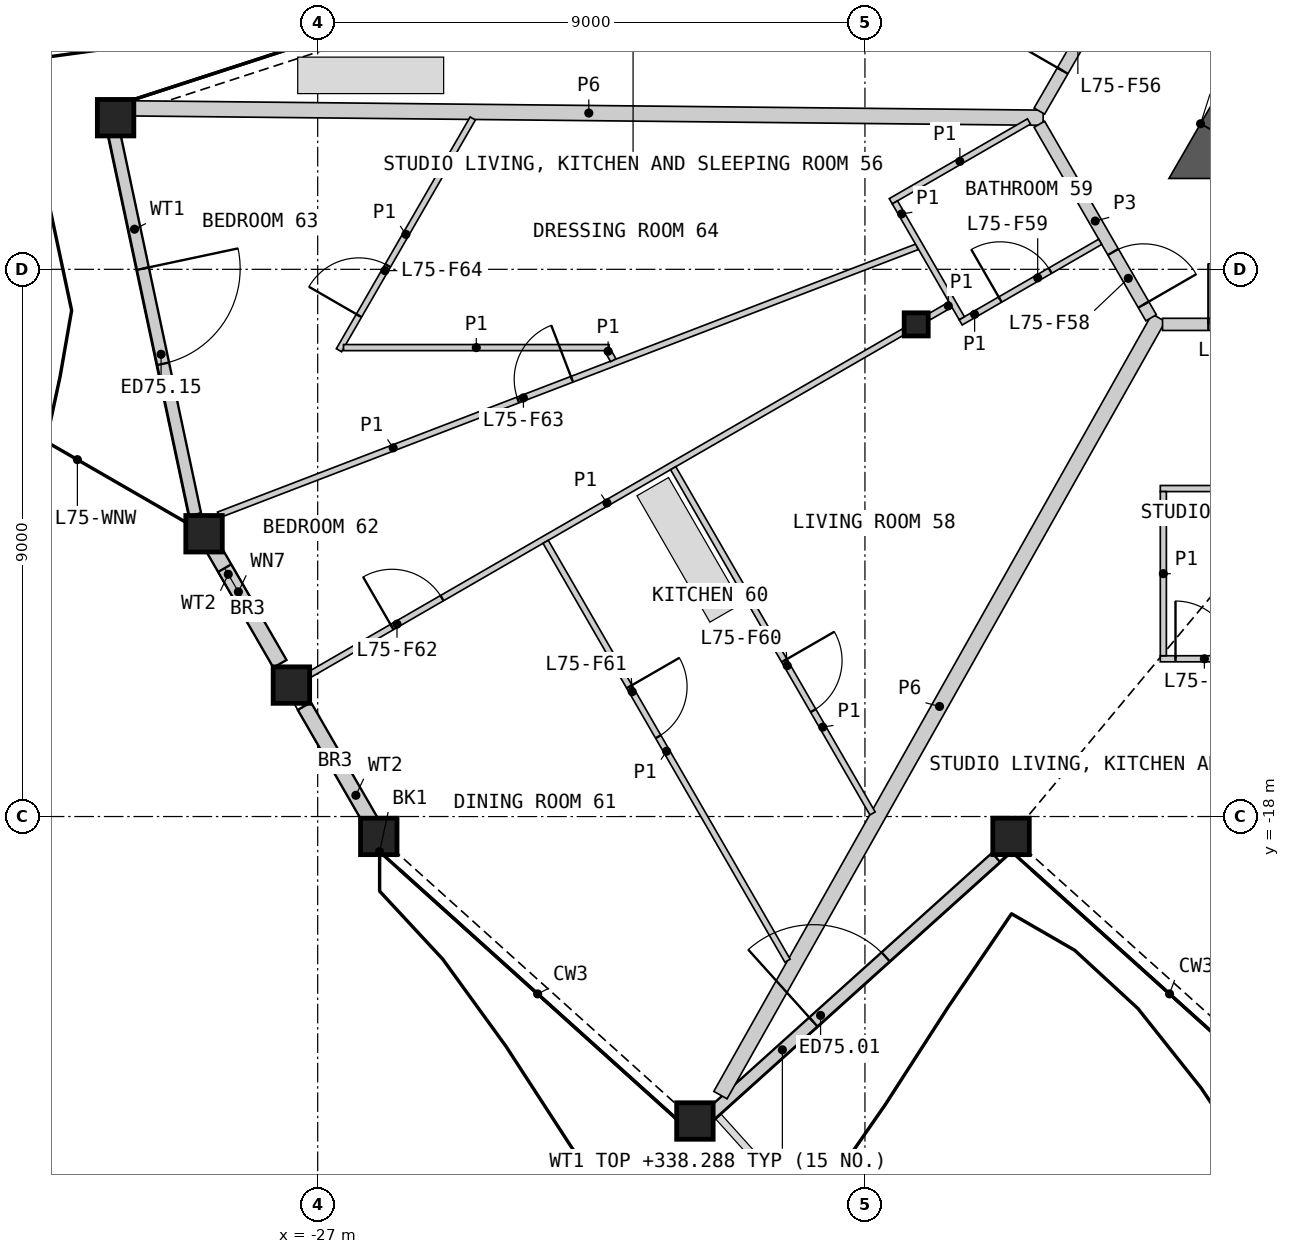
"""IFC4 building model, lengths in metres.
Left out: names, types, materials, properties, quantities, classifications, styles, units other than length and angle.
Written with IfcOpenShell. Run it as: python <this file> out.ifc"""

import sys

from ifc_helpers import new_model, si_unit, direction, frame, frame_2d, origin, origin_2d, place, context, subcontext, project, spatial, polyline, rectangle, hollow_rectangle, i_section, outline, extrude, element, fill, save


model = new_model("IFC4")
c1 = context("Model", 3, precision=1e-05, world=origin(), true_north=direction((0.0, 1.0)))
c2 = subcontext(c1, "Body", "Model", "MODEL_VIEW")
j1 = project(units=[si_unit("LENGTHUNIT", "METRE"), si_unit("PLANEANGLEUNIT", "RADIAN")], contexts=[c1])
p1 = place(None, origin())
s1 = spatial("IfcSite", under=j1, at=p1, CompositionType="ELEMENT")
p2 = place(p1, origin())
s2 = spatial("IfcBuilding", under=s1, at=p2, CompositionType="ELEMENT")
p3 = place(p2, frame((0.0, 0.0, 335.8)))
s3 = spatial("IfcBuildingStorey", under=s2, at=p3, CompositionType="ELEMENT", Elevation=335.8)
for number, where, z_axis, x_axis in (
    (1, (-25.995, -18.327, 0.0), (0.0, 0.0, 1.0), (1.0, 0.0, 0.0)),
    (2, (-20.796, -23.008, 0.0), (0.0, 0.0, 1.0), (1.0, 0.0, 0.0)),
    (3, (-15.597, -18.327, 0.0), (0.0, 0.0, 1.0), (1.0, 0.0, 0.0)),
    (4, (-30.324, -6.506, 0.0), (0.0, 0.0, 1.0), (1.0, 0.0, 0.0)),
    (5, (-28.869, -13.349, 0.0), (0.0, 0.0, 1.0), (1.0, 0.0, 0.0)),
    (6, (-27.432, -15.838, 0.0), (0.0, 0.0, 1.0), (1.0, 0.0, 0.0)),
):
    element("IfcColumn", number, at=place(p3, frame(where, z_axis=z_axis, x_axis=x_axis)), inside=s3, PredefinedType="COLUMN", context=c2, shape_type="SweptSolid", body=[
        extrude(hollow_rectangle(XDim=0.6, YDim=0.6, WallThickness=0.04, at=origin_2d()), origin(), (0.0, 0.0, 1.0), 3.4),
    ])
p4 = place(p3, frame((-17.157, -9.906, 0.0), z_axis=(0.0, 0.0, 1.0), x_axis=(1.0, 0.0, 0.0)))
e7 = element("IfcColumn", 7, at=p4, inside=s3, PredefinedType="COLUMN", context=c2, shape_type="SweptSolid", body=[
    extrude(i_section(OverallWidth=0.396, OverallDepth=0.381, WebThickness=0.019, FlangeThickness=0.03, at=origin_2d()), origin(), (0.0, 0.0, 1.0), 3.4),
])
p5 = place(p3, frame((-20.53, -22.892, 0.0), z_axis=(0.0, 0.0, 1.0), x_axis=(0.743134328827, 0.669142263887, 0.0)))
e8 = element("IfcWall", 8, at=p5, inside=s3, PredefinedType="SOLIDWALL", context=c2, shape_type="SweptSolid", body=[
    extrude(rectangle(XDim=6.305, YDim=0.2, at=frame_2d((3.153, 0.0))), origin(), (0.0, 0.0, 1.0), 2.488),
])
p6 = place(p5, frame((2.262, 0.0, 0.0)))
e9 = element("IfcOpeningElement", 9, at=p6, cuts=e8, PredefinedType="OPENING", context=c2, shape_type="SweptSolid", body=[
    extrude(rectangle(XDim=1.6, YDim=2.25, at=frame_2d((0.8, 1.125))), frame((0.0, 0.11, 0.0), z_axis=(0.0, -1.0, 0.0), x_axis=(1.0, 0.0, 0.0)), (0.0, 0.0, 1.0), 0.22),
])
p7 = place(p3, frame((-30.345, -6.776, 0.0), z_axis=(0.0, 0.0, 1.0), x_axis=(0.207897099812, -0.978150702034, 0.0)))
e10 = element("IfcWall", 10, at=p7, inside=s3, PredefinedType="SOLIDWALL", context=c2, shape_type="SweptSolid", body=[
    extrude(rectangle(XDim=6.396, YDim=0.2, at=frame_2d((3.198, 0.0))), origin(), (0.0, 0.0, 1.0), 2.488),
])
p8 = place(p7, frame((2.262, 0.0, 0.0)))
e11 = element("IfcOpeningElement", 11, at=p8, cuts=e10, PredefinedType="OPENING", context=c2, shape_type="SweptSolid", body=[
    extrude(rectangle(XDim=1.6, YDim=2.25, at=frame_2d((0.8, 1.125))), frame((0.0, 0.11, 0.0), z_axis=(0.0, -1.0, 0.0), x_axis=(1.0, 0.0, 0.0)), (0.0, 0.0, 1.0), 0.22),
])
p9 = place(p3, frame((-28.754, -13.525, 0.0), z_axis=(0.0, 0.0, 1.0), x_axis=(0.49996174997, -0.866047486323, 0.0)))
e12 = element("IfcWall", 12, at=p9, inside=s3, PredefinedType="SOLIDWALL", context=c2, shape_type="SweptSolid", body=[
    extrude(rectangle(XDim=2.267, YDim=0.25, at=frame_2d((1.133, 0.0))), origin(), (0.0, 0.0, 1.0), 2.488),
])
p10 = place(p9, frame((0.45, 0.0, 1.6)))
e13 = element("IfcOpeningElement", 13, at=p10, cuts=e12, PredefinedType="OPENING", context=c2, shape_type="SweptSolid", body=[
    extrude(rectangle(XDim=0.9, YDim=0.6, at=frame_2d((0.45, 0.3))), frame((0.0, 0.135, 0.0), z_axis=(0.0, -1.0, 0.0), x_axis=(1.0, 0.0, 0.0)), (0.0, 0.0, 1.0), 0.27),
])
p11 = place(p3, frame((-27.219, -16.184, 0.0), z_axis=(0.0, 0.0, 1.0), x_axis=(0.500046963369, -0.865998287773, 0.0)))
e14 = element("IfcWall", 14, at=p11, inside=s3, PredefinedType="SOLIDWALL", context=c2, shape_type="SweptSolid", body=[
    extrude(rectangle(XDim=2.258, YDim=0.25, at=frame_2d((1.129, 0.0))), origin(), (0.0, 0.0, 1.0), 2.488),
])
p12 = place(p3, frame((-9.562, -2.15, 0.0), z_axis=(0.0, 0.0, 1.0), x_axis=(-0.500015214976, -0.866016619236, 0.0)))
e15 = element("IfcWall", 15, at=p12, inside=s3, PredefinedType="SHEAR", context=c2, shape_type="SweptSolid", body=[
    extrude(rectangle(XDim=5.318, YDim=0.6, at=frame_2d((2.659, 0.0))), origin(), (0.0, 0.0, 1.0), 3.1),
])
p13 = place(p3, origin())
e16 = element("IfcWall", 16, at=p13, inside=s3, PredefinedType="SHEAR", context=c2, shape_type="SweptSolid", body=[
    extrude(outline(polyline([(-12.48, -6.606), (-11.961, -6.906), (-11.961, -7.506), (-13.0, -7.506), (-12.48, -6.606)])), origin(), (0.0, 0.0, 1.0), 3.1),
])
p14 = place(p3, frame((-30.014, -6.353, 0.0), z_axis=(0.0, 0.0, 1.0), x_axis=(0.999946875776, -0.010307551845, 0.0)))
e17 = element("IfcWall", 17, at=p14, inside=s3, PredefinedType="PARTITIONING", context=c2, shape_type="SweptSolid", body=[
    extrude(rectangle(XDim=14.946, YDim=0.25, at=frame_2d((7.473, 0.0))), origin(), (0.0, 0.0, 1.0), 2.33),
])
p15 = place(p3, frame((-20.376, -22.582, 0.0), z_axis=(0.0, 0.0, 1.0), x_axis=(0.491057132664, 0.871127368678, 0.0)))
e18 = element("IfcWall", 18, at=p15, inside=s3, PredefinedType="PARTITIONING", context=c2, shape_type="SweptSolid", body=[
    extrude(rectangle(XDim=14.677, YDim=0.25, at=frame_2d((7.338, 0.0))), origin(), (0.0, 0.0, 1.0), 2.33),
])
p16 = place(p3, frame((-13.106, -9.906, 0.0), z_axis=(0.0, 0.0, 1.0), x_axis=(1.0, 0.0, 0.0)))
e19 = element("IfcWall", 19, at=p16, inside=s3, PredefinedType="PARTITIONING", context=c2, shape_type="SweptSolid", body=[
    extrude(rectangle(XDim=4.32, YDim=0.2, at=frame_2d((2.16, 0.0))), origin(), (0.0, 0.0, 1.0), 3.1),
])
p17 = place(p16, frame((0.753, 0.0, 0.0)))
e20 = element("IfcOpeningElement", 20, at=p17, cuts=e19, PredefinedType="OPENING", context=c2, shape_type="SweptSolid", body=[
    extrude(rectangle(XDim=1.0, YDim=2.1, at=frame_2d((0.5, 1.05))), frame((0.0, 0.11, 0.0), z_axis=(0.0, -1.0, 0.0), x_axis=(1.0, 0.0, 0.0)), (0.0, 0.0, 1.0), 0.22),
])
p18 = place(p3, frame((-15.131, -6.397, 0.0), z_axis=(0.0, 0.0, 1.0), x_axis=(0.500003406062, 0.866023437285, 0.0)))
e21 = element("IfcWall", 21, at=p18, inside=s3, PredefinedType="PARTITIONING", context=c2, shape_type="SweptSolid", body=[
    extrude(rectangle(XDim=4.288, YDim=0.2, at=frame_2d((2.144, 0.0))), origin(), (0.0, 0.0, 1.0), 3.1),
])
p19 = place(p18, frame((0.766, 0.0, 0.0)))
e22 = element("IfcOpeningElement", 22, at=p19, cuts=e21, PredefinedType="OPENING", context=c2, shape_type="SweptSolid", body=[
    extrude(rectangle(XDim=1.0, YDim=2.1, at=frame_2d((0.5, 1.05))), frame((0.0, 0.11, 0.0), z_axis=(0.0, -1.0, 0.0), x_axis=(1.0, 0.0, 0.0)), (0.0, 0.0, 1.0), 0.22),
])
p20 = place(p3, frame((-15.131, -6.614, 0.0), z_axis=(0.0, 0.0, 1.0), x_axis=(0.499967746641, -0.866044024469, 0.0)))
e23 = element("IfcWall", 23, at=p20, inside=s3, PredefinedType="PARTITIONING", context=c2, shape_type="SweptSolid", body=[
    extrude(rectangle(XDim=3.676, YDim=0.2, at=frame_2d((1.838, 0.0))), origin(), (0.0, 0.0, 1.0), 3.1),
])
p21 = place(p20, frame((2.426, 0.0, 0.0)))
e24 = element("IfcOpeningElement", 24, at=p21, cuts=e23, PredefinedType="OPENING", context=c2, shape_type="SweptSolid", body=[
    extrude(rectangle(XDim=1.0, YDim=2.1, at=frame_2d((0.5, 1.05))), frame((0.0, 0.11, 0.0), z_axis=(0.0, -1.0, 0.0), x_axis=(1.0, 0.0, 0.0)), (0.0, 0.0, 1.0), 0.22),
])
p22 = place(p3, frame((-28.631, -13.039, 0.0), z_axis=(0.0, 0.0, 1.0), x_axis=(0.933581130309, 0.358366116048, 0.0)))
e25 = element("IfcWall", 25, at=p22, inside=s3, PredefinedType="PARTITIONING", context=c2, shape_type="SweptSolid", body=[
    extrude(rectangle(XDim=12.306, YDim=0.1, at=frame_2d((6.153, 0.0))), origin(), (0.0, 0.0, 1.0), 2.33),
])
p23 = place(p22, frame((5.276, 0.0, 0.0)))
e26 = element("IfcOpeningElement", 26, at=p23, cuts=e25, PredefinedType="OPENING", context=c2, shape_type="SweptSolid", body=[
    extrude(rectangle(XDim=0.95, YDim=2.1, at=frame_2d((0.475, 1.05))), frame((0.0, 0.06, 0.0), z_axis=(0.0, -1.0, 0.0), x_axis=(1.0, 0.0, 0.0)), (0.0, 0.0, 1.0), 0.12),
])
p24 = place(p3, frame((-27.122, -15.659, 0.0), z_axis=(0.0, 0.0, 1.0), x_axis=(0.866021046153, 0.500007547564, 0.0)))
e27 = element("IfcWall", 27, at=p24, inside=s3, PredefinedType="PARTITIONING", context=c2, shape_type="SweptSolid", body=[
    extrude(rectangle(XDim=11.267, YDim=0.1, at=frame_2d((5.634, 0.0))), origin(), (0.0, 0.0, 1.0), 2.33),
])
p25 = place(p24, frame((1.552, 0.0, 0.0)))
e28 = element("IfcOpeningElement", 28, at=p25, cuts=e27, PredefinedType="OPENING", context=c2, shape_type="SweptSolid", body=[
    extrude(rectangle(XDim=0.95, YDim=2.1, at=frame_2d((0.475, 1.05))), frame((0.0, 0.06, 0.0), z_axis=(0.0, -1.0, 0.0), x_axis=(1.0, 0.0, 0.0)), (0.0, 0.0, 1.0), 0.12),
])
p26 = place(p3, frame((-23.251, -13.482, 0.0), z_axis=(0.0, 0.0, 1.0), x_axis=(0.500017325895, -0.866015400443, 0.0)))
e29 = element("IfcWall", 29, at=p26, inside=s3, PredefinedType="PARTITIONING", context=c2, shape_type="SweptSolid", body=[
    extrude(rectangle(XDim=7.955, YDim=0.1, at=frame_2d((3.978, 0.0))), origin(), (0.0, 0.0, 1.0), 2.33),
])
p27 = place(p26, frame((2.752, 0.0, 0.0)))
e30 = element("IfcOpeningElement", 30, at=p27, cuts=e29, PredefinedType="OPENING", context=c2, shape_type="SweptSolid", body=[
    extrude(rectangle(XDim=0.95, YDim=2.1, at=frame_2d((0.475, 1.05))), frame((0.0, 0.06, 0.0), z_axis=(0.0, -1.0, 0.0), x_axis=(1.0, 0.0, 0.0)), (0.0, 0.0, 1.0), 0.12),
])
p28 = place(p3, frame((-21.154, -12.271, 0.0), z_axis=(0.0, 0.0, 1.0), x_axis=(0.500011451804, -0.866018791981, 0.0)))
e31 = element("IfcWall", 31, at=p28, inside=s3, PredefinedType="PARTITIONING", context=c2, shape_type="SweptSolid", body=[
    extrude(rectangle(XDim=6.557, YDim=0.1, at=frame_2d((3.278, 0.0))), origin(), (0.0, 0.0, 1.0), 2.33),
])
p29 = place(p28, frame((3.655, 0.0, 0.0)))
e32 = element("IfcOpeningElement", 32, at=p29, cuts=e31, PredefinedType="OPENING", context=c2, shape_type="SweptSolid", body=[
    extrude(rectangle(XDim=0.95, YDim=2.1, at=frame_2d((0.475, 1.05))), frame((0.0, 0.06, 0.0), z_axis=(0.0, -1.0, 0.0), x_axis=(1.0, 0.0, 0.0)), (0.0, 0.0, 1.0), 0.12),
])
p30 = place(p3, frame((-13.143, -12.606, 0.0), z_axis=(0.0, 0.0, 1.0), x_axis=(1.0, 0.0, 0.0)))
e33 = element("IfcWall", 33, at=p30, inside=s3, PredefinedType="PARTITIONING", context=c2, shape_type="SweptSolid", body=[
    extrude(rectangle(XDim=5.5, YDim=0.1, at=frame_2d((2.75, 0.0))), origin(), (0.0, 0.0, 1.0), 2.33),
])
p31 = place(p3, frame((-13.143, -15.406, 0.0), z_axis=(0.0, 0.0, 1.0), x_axis=(1.0, 0.0, 0.0)))
e34 = element("IfcWall", 34, at=p31, inside=s3, PredefinedType="PARTITIONING", context=c2, shape_type="SweptSolid", body=[
    extrude(rectangle(XDim=5.5, YDim=0.1, at=frame_2d((2.75, 0.0))), origin(), (0.0, 0.0, 1.0), 2.33),
])
p32 = place(p31, frame((0.25, 0.0, 0.0)))
e35 = element("IfcOpeningElement", 35, at=p32, cuts=e34, PredefinedType="OPENING", context=c2, shape_type="SweptSolid", body=[
    extrude(rectangle(XDim=0.95, YDim=2.1, at=frame_2d((0.475, 1.05))), frame((0.0, 0.06, 0.0), z_axis=(0.0, -1.0, 0.0), x_axis=(1.0, 0.0, 0.0)), (0.0, 0.0, 1.0), 0.12),
])
p33 = place(p31, frame((3.591, 0.0, 0.0)))
e36 = element("IfcOpeningElement", 36, at=p33, cuts=e34, PredefinedType="OPENING", context=c2, shape_type="SweptSolid", body=[
    extrude(rectangle(XDim=0.95, YDim=2.1, at=frame_2d((0.475, 1.05))), frame((0.0, 0.06, 0.0), z_axis=(0.0, -1.0, 0.0), x_axis=(1.0, 0.0, 0.0)), (0.0, 0.0, 1.0), 0.12),
])
p34 = place(p3, frame((-26.65, -10.331, 0.0), z_axis=(0.0, 0.0, 1.0), x_axis=(0.499992938033, 0.866029480975, 0.0)))
e37 = element("IfcWall", 37, at=p34, inside=s3, PredefinedType="PARTITIONING", context=c2, shape_type="SweptSolid", body=[
    extrude(rectangle(XDim=4.401, YDim=0.1, at=frame_2d((2.201, 0.0))), origin(), (0.0, 0.0, 1.0), 2.33),
])
p35 = place(p34, frame((0.657, 0.0, 0.0)))
e38 = element("IfcOpeningElement", 38, at=p35, cuts=e37, PredefinedType="OPENING", context=c2, shape_type="SweptSolid", body=[
    extrude(rectangle(XDim=0.95, YDim=2.1, at=frame_2d((0.475, 1.05))), frame((0.0, 0.06, 0.0), z_axis=(0.0, -1.0, 0.0), x_axis=(1.0, 0.0, 0.0)), (0.0, 0.0, 1.0), 0.12),
])
p36 = place(p3, frame((-26.575, -10.287, 0.0), z_axis=(0.0, 0.0, 1.0), x_axis=(1.0, 0.0, 0.0)))
e39 = element("IfcWall", 39, at=p36, inside=s3, PredefinedType="PARTITIONING", context=c2, shape_type="SweptSolid", body=[
    extrude(rectangle(XDim=4.367, YDim=0.1, at=frame_2d((2.184, 0.0))), origin(), (0.0, 0.0, 1.0), 2.33),
])
p37 = place(p3, frame((-13.093, -15.356, 0.0), z_axis=(0.0, 0.0, 1.0), x_axis=(0.0, 1.0, 0.0)))
e40 = element("IfcWall", 40, at=p37, inside=s3, PredefinedType="PARTITIONING", context=c2, shape_type="SweptSolid", body=[
    extrude(rectangle(XDim=2.7, YDim=0.1, at=frame_2d((1.35, 0.0))), origin(), (0.0, 0.0, 1.0), 2.33),
])
p38 = place(p3, frame((-16.426, -9.872, 0.0), z_axis=(0.0, 0.0, 1.0), x_axis=(0.866029095148, 0.499993606316, 0.0)))
e41 = element("IfcWall", 41, at=p38, inside=s3, PredefinedType="PARTITIONING", context=c2, shape_type="SweptSolid", body=[
    extrude(rectangle(XDim=2.65, YDim=0.1, at=frame_2d((1.325, 0.0))), origin(), (0.0, 0.0, 1.0), 2.33),
])
p39 = place(p38, frame((0.75, 0.0, 0.0)))
e42 = element("IfcOpeningElement", 42, at=p39, cuts=e41, PredefinedType="OPENING", context=c2, shape_type="SweptSolid", body=[
    extrude(rectangle(XDim=0.95, YDim=2.1, at=frame_2d((0.475, 1.05))), frame((0.0, 0.06, 0.0), z_axis=(0.0, -1.0, 0.0), x_axis=(1.0, 0.0, 0.0)), (0.0, 0.0, 1.0), 0.12),
])
p40 = place(p3, frame((-17.575, -7.881, 0.0), z_axis=(0.0, 0.0, 1.0), x_axis=(0.866036909293, 0.499980071345, 0.0)))
e43 = element("IfcWall", 43, at=p40, inside=s3, PredefinedType="PARTITIONING", context=c2, shape_type="SweptSolid", body=[
    extrude(rectangle(XDim=2.625, YDim=0.1, at=frame_2d((1.312, 0.0))), origin(), (0.0, 0.0, 1.0), 2.33),
])
p41 = place(p3, frame((-17.507, -7.899, 0.0), z_axis=(0.0, 0.0, 1.0), x_axis=(0.499946605688, -0.86605622881, 0.0)))
e44 = element("IfcWall", 44, at=p41, inside=s3, PredefinedType="PARTITIONING", context=c2, shape_type="SweptSolid", body=[
    extrude(rectangle(XDim=2.2, YDim=0.1, at=frame_2d((1.1, 0.0))), origin(), (0.0, 0.0, 1.0), 2.33),
])
p42 = place(p3, frame((-16.949, -9.786, 0.0), z_axis=(0.0, 0.0, 1.0), x_axis=(0.866036909293, 0.499980071345, 0.0)))
e45 = element("IfcWall", 45, at=p42, inside=s3, PredefinedType="PARTITIONING", context=c2, shape_type="SweptSolid", body=[
    extrude(rectangle(XDim=0.41, YDim=0.1, at=frame_2d((0.205, 0.0))), origin(), (0.0, 0.0, 1.0), 2.33),
])
p43 = place(p3, frame((-22.233, -10.331, 0.0), z_axis=(0.0, 0.0, 1.0), x_axis=(0.500169931485, -0.865927271564, 0.0)))
e46 = element("IfcWall", 46, at=p43, inside=s3, PredefinedType="PARTITIONING", context=c2, shape_type="SweptSolid", body=[
    extrude(rectangle(XDim=0.189, YDim=0.1, at=frame_2d((0.094, 0.0))), origin(), (0.0, 0.0, 1.0), 2.33),
])
p44 = place(p6, origin())
e47 = element("IfcDoor", 47, at=p44, inside=s3, OperationType="DOUBLE_DOOR_SINGLE_SWING", PredefinedType="DOOR", context=c2, shape_type="SweptSolid", body=[
    extrude(rectangle(XDim=1.6, YDim=2.25, at=frame_2d((0.8, 1.125))), frame((0.0, 0.025, 0.0), z_axis=(0.0, -1.0, 0.0), x_axis=(1.0, 0.0, 0.0)), (0.0, 0.0, 1.0), 0.05),
])
fill(e9, e47)
p45 = place(p8, origin())
e48 = element("IfcDoor", 48, at=p45, inside=s3, OperationType="DOUBLE_DOOR_SINGLE_SWING", PredefinedType="DOOR", context=c2, shape_type="SweptSolid", body=[
    extrude(rectangle(XDim=1.6, YDim=2.25, at=frame_2d((0.8, 1.125))), frame((0.0, 0.025, 0.0), z_axis=(0.0, -1.0, 0.0), x_axis=(1.0, 0.0, 0.0)), (0.0, 0.0, 1.0), 0.05),
])
fill(e11, e48)
p46 = place(p10, origin())
e49 = element("IfcWindow", 49, at=p46, inside=s3, PartitioningType="SINGLE_PANEL", PredefinedType="WINDOW", context=c2, shape_type="SweptSolid", body=[
    extrude(rectangle(XDim=0.9, YDim=0.6, at=frame_2d((0.45, 0.3))), frame((0.0, 0.03, 0.0), z_axis=(0.0, -1.0, 0.0), x_axis=(1.0, 0.0, 0.0)), (0.0, 0.0, 1.0), 0.06),
])
fill(e13, e49)
p47 = place(p17, origin())
e50 = element("IfcDoor", 50, at=p47, inside=s3, OperationType="SINGLE_SWING_LEFT", PredefinedType="DOOR", context=c2, shape_type="SweptSolid", body=[
    extrude(rectangle(XDim=1.0, YDim=2.1, at=frame_2d((0.5, 1.05))), frame((0.0, 0.025, 0.0), z_axis=(0.0, -1.0, 0.0), x_axis=(1.0, 0.0, 0.0)), (0.0, 0.0, 1.0), 0.05),
])
fill(e20, e50)
p48 = place(p32, origin())
e51 = element("IfcDoor", 51, at=p48, inside=s3, OperationType="SINGLE_SWING_LEFT", PredefinedType="DOOR", context=c2, shape_type="SweptSolid", body=[
    extrude(rectangle(XDim=0.95, YDim=2.1, at=frame_2d((0.475, 1.05))), frame((0.0, 0.025, 0.0), z_axis=(0.0, -1.0, 0.0), x_axis=(1.0, 0.0, 0.0)), (0.0, 0.0, 1.0), 0.05),
])
fill(e35, e51)
p49 = place(p19, origin())
e52 = element("IfcDoor", 52, at=p49, inside=s3, OperationType="SINGLE_SWING_LEFT", PredefinedType="DOOR", context=c2, shape_type="SweptSolid", body=[
    extrude(rectangle(XDim=1.0, YDim=2.1, at=frame_2d((0.5, 1.05))), frame((0.0, 0.025, 0.0), z_axis=(0.0, -1.0, 0.0), x_axis=(1.0, 0.0, 0.0)), (0.0, 0.0, 1.0), 0.05),
])
fill(e22, e52)
p50 = place(p21, origin())
e53 = element("IfcDoor", 53, at=p50, inside=s3, OperationType="SINGLE_SWING_RIGHT", PredefinedType="DOOR", context=c2, shape_type="SweptSolid", body=[
    extrude(rectangle(XDim=1.0, YDim=2.1, at=frame_2d((0.5, 1.05))), frame((0.0, 0.025, 0.0), z_axis=(0.0, -1.0, 0.0), x_axis=(1.0, 0.0, 0.0)), (0.0, 0.0, 1.0), 0.05),
])
fill(e24, e53)
p51 = place(p39, origin())
e54 = element("IfcDoor", 54, at=p51, inside=s3, OperationType="SINGLE_SWING_LEFT", PredefinedType="DOOR", context=c2, shape_type="SweptSolid", body=[
    extrude(rectangle(XDim=0.95, YDim=2.1, at=frame_2d((0.475, 1.05))), frame((0.0, 0.025, 0.0), z_axis=(0.0, -1.0, 0.0), x_axis=(1.0, 0.0, 0.0)), (0.0, 0.0, 1.0), 0.05),
])
fill(e42, e54)
p52 = place(p29, origin())
e55 = element("IfcDoor", 55, at=p52, inside=s3, OperationType="SINGLE_SWING_LEFT", PredefinedType="DOOR", context=c2, shape_type="SweptSolid", body=[
    extrude(rectangle(XDim=0.95, YDim=2.1, at=frame_2d((0.475, 1.05))), frame((0.0, 0.025, 0.0), z_axis=(0.0, -1.0, 0.0), x_axis=(1.0, 0.0, 0.0)), (0.0, 0.0, 1.0), 0.05),
])
fill(e32, e55)
p53 = place(p27, origin())
e56 = element("IfcDoor", 56, at=p53, inside=s3, OperationType="SINGLE_SWING_LEFT", PredefinedType="DOOR", context=c2, shape_type="SweptSolid", body=[
    extrude(rectangle(XDim=0.95, YDim=2.1, at=frame_2d((0.475, 1.05))), frame((0.0, 0.025, 0.0), z_axis=(0.0, -1.0, 0.0), x_axis=(1.0, 0.0, 0.0)), (0.0, 0.0, 1.0), 0.05),
])
fill(e30, e56)
p54 = place(p25, origin())
e57 = element("IfcDoor", 57, at=p54, inside=s3, OperationType="SINGLE_SWING_LEFT", PredefinedType="DOOR", context=c2, shape_type="SweptSolid", body=[
    extrude(rectangle(XDim=0.95, YDim=2.1, at=frame_2d((0.475, 1.05))), frame((0.0, 0.025, 0.0), z_axis=(0.0, -1.0, 0.0), x_axis=(1.0, 0.0, 0.0)), (0.0, 0.0, 1.0), 0.05),
])
fill(e28, e57)
p55 = place(p23, origin())
e58 = element("IfcDoor", 58, at=p55, inside=s3, OperationType="SINGLE_SWING_RIGHT", PredefinedType="DOOR", context=c2, shape_type="SweptSolid", body=[
    extrude(rectangle(XDim=0.95, YDim=2.1, at=frame_2d((0.475, 1.05))), frame((0.0, 0.025, 0.0), z_axis=(0.0, -1.0, 0.0), x_axis=(1.0, 0.0, 0.0)), (0.0, 0.0, 1.0), 0.05),
])
fill(e26, e58)
p56 = place(p35, origin())
e59 = element("IfcDoor", 59, at=p56, inside=s3, OperationType="SINGLE_SWING_LEFT", PredefinedType="DOOR", context=c2, shape_type="SweptSolid", body=[
    extrude(rectangle(XDim=0.95, YDim=2.1, at=frame_2d((0.475, 1.05))), frame((0.0, 0.025, 0.0), z_axis=(0.0, -1.0, 0.0), x_axis=(1.0, 0.0, 0.0)), (0.0, 0.0, 1.0), 0.05),
])
fill(e38, e59)
save(model, sys.argv[1])
